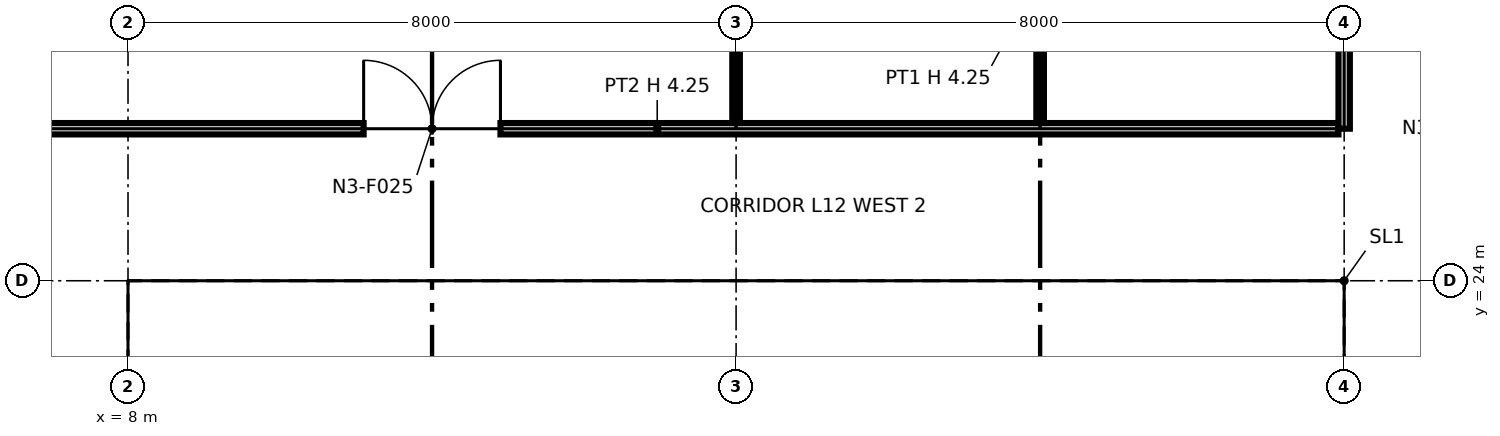
"""IFC4 building model, lengths in metres.
Left out: names, types, materials, properties, quantities, classifications, styles, units other than length and angle.
Written with IfcOpenShell. Run it as: python <this file> out.ifc"""

import sys

from ifc_helpers import new_model, si_unit, direction, frame, frame_2d, origin, origin_2d, place, context, subcontext, project, spatial, polyline, rectangle, i_section, outline, extrude, element, fill, save


model = new_model("IFC4")
c1 = context("Model", 3, precision=1e-05, world=origin(), true_north=direction((0.0, 1.0)))
c2 = subcontext(c1, "Body", "Model", "MODEL_VIEW")
j1 = project(units=[si_unit("LENGTHUNIT", "METRE"), si_unit("PLANEANGLEUNIT", "RADIAN")], contexts=[c1])
p1 = place(None, origin())
s1 = spatial("IfcSite", under=j1, at=p1, CompositionType="ELEMENT")
p2 = place(p1, origin())
s2 = spatial("IfcBuilding", under=s1, at=p2, CompositionType="ELEMENT")
p3 = place(p2, frame((0.0, 0.0, 70.0)))
s3 = spatial("IfcBuildingStorey", under=s2, at=p3, CompositionType="ELEMENT", Elevation=70.0)
for number, where, z_axis, x_axis in (
    (1, (8.0, 24.0, 0.0), (0.0, 0.0, 1.0), (1.0, 0.0, 0.0)),
    (2, (16.0, 24.0, 0.0), (0.0, 0.0, 1.0), (1.0, 0.0, 0.0)),
    (3, (24.0, 24.0, 0.0), (0.0, 0.0, 1.0), (1.0, 0.0, 0.0)),
):
    element("IfcColumn", number, at=place(p3, frame(where, z_axis=z_axis, x_axis=x_axis)), inside=s3, PredefinedType="COLUMN", context=c2, shape_type="SweptSolid", body=[
        extrude(i_section(OverallWidth=0.411, OverallDepth=0.434, WebThickness=0.036, FlangeThickness=0.057, at=origin_2d()), origin(), (0.0, 0.0, 1.0), 4.25),
    ])
p4 = place(p3, frame((8.75, 8.85, 0.0), z_axis=(0.0, 0.0, 1.0), x_axis=(0.0, 1.0, 0.0)))
e4 = element("IfcWall", 4, at=p4, inside=s3, PredefinedType="PARTITIONING", context=c2, shape_type="SweptSolid", body=[
    extrude(outline(polyline([(0.0, 0.0), (14.3, 0.0), (14.3, 4.25), (10.231, 4.25), (10.23, 3.789), (10.07, 3.789), (10.069, 4.25), (7.27, 4.25), (7.269, 3.632), (7.031, 3.632), (7.031, 4.25), (0.0, 4.25), (0.0, 0.0)])), frame((0.0, 0.1, 0.0), z_axis=(0.0, -1.0, 0.0), x_axis=(1.0, 0.0, 0.0)), (0.0, 0.0, 1.0), 0.2),
])
p5 = place(p4, frame((8.3, 0.0, 0.0)))
e5 = element("IfcOpeningElement", 5, at=p5, cuts=e4, PredefinedType="OPENING", context=c2, shape_type="SweptSolid", body=[
    extrude(rectangle(XDim=1.8, YDim=2.1, at=frame_2d((0.9, 1.05))), frame((0.0, 0.11, 0.0), z_axis=(0.0, -1.0, 0.0), x_axis=(1.0, 0.0, 0.0)), (0.0, 0.0, 1.0), 0.22),
])
p6 = place(p3, frame((8.65, 23.25, 0.0), z_axis=(0.0, 0.0, 1.0), x_axis=(1.0, 0.0, 0.0)))
e6 = element("IfcWall", 6, at=p6, inside=s3, PredefinedType="PARTITIONING", context=c2, shape_type="SweptSolid", body=[
    extrude(outline(polyline([(0.0, 0.0), (14.7, 0.0), (14.7, 4.25), (7.469, 4.25), (7.469, 3.632), (7.231, 3.632), (7.23, 4.25), (0.0, 4.25), (0.0, 0.0)])), frame((0.0, 0.1, 0.0), z_axis=(0.0, -1.0, 0.0), x_axis=(1.0, 0.0, 0.0)), (0.0, 0.0, 1.0), 0.2),
])
for number, where, z_axis, x_axis in (
    (7, (11.6, 20.0, 0.0), (0.0, 0.0, 1.0), (0.0, 1.0, 0.0)),
    (8, (14.3, 20.0, 0.0), (0.0, 0.0, 1.0), (0.0, 1.0, 0.0)),
):
    element("IfcWall", number, at=place(p3, frame(where, z_axis=z_axis, x_axis=x_axis)), inside=s3, PredefinedType="PARTITIONING", context=c2, shape_type="SweptSolid", body=[
        extrude(rectangle(XDim=3.15, YDim=0.2, at=frame_2d((1.575, 0.0))), origin(), (0.0, 0.0, 1.0), 4.25),
    ])
for number, where, z_axis, x_axis in (
    (9, (18.075, 20.0, 0.0), (0.0, 0.0, 1.0), (0.0, 1.0, 0.0)),
    (10, (20.425, 20.0, 0.0), (0.0, 0.0, 1.0), (0.0, 1.0, 0.0)),
):
    element("IfcWall", number, at=place(p3, frame(where, z_axis=z_axis, x_axis=x_axis)), inside=s3, PredefinedType="PARTITIONING", context=c2, shape_type="SweptSolid", body=[
        extrude(outline(polyline([(0.0, 0.0), (3.15, 0.0), (3.15, 4.25), (0.082, 4.25), (0.081, 3.789), (0.0, 3.789), (0.0, 0.0)])), frame((0.0, 0.075, 0.0), z_axis=(0.0, -1.0, 0.0), x_axis=(1.0, 0.0, 0.0)), (0.0, 0.0, 1.0), 0.15),
    ])
p7 = place(p3, frame((23.25, 8.85, 0.0), z_axis=(0.0, 0.0, 1.0), x_axis=(0.0, 1.0, 0.0)))
e11 = element("IfcWall", 11, at=p7, inside=s3, PredefinedType="PARTITIONING", context=c2, shape_type="SweptSolid", body=[
    extrude(outline(polyline([(0.0, 0.0), (14.3, 0.0), (14.3, 4.25), (11.231, 4.25), (11.23, 3.789), (11.07, 3.789), (11.069, 4.25), (7.27, 4.25), (7.269, 3.632), (7.031, 3.632), (7.031, 4.25), (1.231, 4.25), (1.23, 3.789), (1.07, 3.789), (1.069, 4.25), (0.0, 4.25), (0.0, 0.0)])), frame((0.0, 0.1, 0.0), z_axis=(0.0, -1.0, 0.0), x_axis=(1.0, 0.0, 0.0)), (0.0, 0.0, 1.0), 0.2),
])
p8 = place(p7, frame((8.3, 0.0, 0.0)))
e12 = element("IfcOpeningElement", 12, at=p8, cuts=e11, PredefinedType="OPENING", context=c2, shape_type="SweptSolid", body=[
    extrude(rectangle(XDim=1.8, YDim=2.1, at=frame_2d((0.9, 1.05))), frame((0.0, 0.11, 0.0), z_axis=(0.0, -1.0, 0.0), x_axis=(1.0, 0.0, 0.0)), (0.0, 0.0, 1.0), 0.22),
])
p9 = place(p3, frame((6.0, 26.0, 0.0), z_axis=(0.0, 0.0, 1.0), x_axis=(1.0, 0.0, 0.0)))
e13 = element("IfcWall", 13, at=p9, inside=s3, PredefinedType="PARTITIONING", context=c2, shape_type="SweptSolid", body=[
    extrude(rectangle(XDim=17.925, YDim=0.15, at=frame_2d((8.962, 0.0))), origin(), (0.0, 0.0, 1.0), 4.25),
])
p10 = place(p9, frame((5.1, 0.0, 0.0)))
e14 = element("IfcOpeningElement", 14, at=p10, cuts=e13, PredefinedType="OPENING", context=c2, shape_type="SweptSolid", body=[
    extrude(rectangle(XDim=1.8, YDim=2.1, at=frame_2d((0.9, 1.05))), frame((0.0, 0.085, 0.0), z_axis=(0.0, -1.0, 0.0), x_axis=(1.0, 0.0, 0.0)), (0.0, 0.0, 1.0), 0.17),
])
p11 = place(p3, frame((16.0, 26.075, 0.0), z_axis=(0.0, 0.0, 1.0), x_axis=(0.0, 1.0, 0.0)))
e15 = element("IfcWall", 15, at=p11, inside=s3, PredefinedType="PARTITIONING", context=c2, shape_type="SweptSolid", body=[
    extrude(rectangle(XDim=3.85, YDim=0.1, at=frame_2d((1.925, 0.0))), origin(), (0.0, 0.0, 1.0), 3.47),
])
p12 = place(p3, frame((20.0, 26.075, 0.0), z_axis=(0.0, 0.0, 1.0), x_axis=(0.0, 1.0, 0.0)))
e16 = element("IfcWall", 16, at=p12, inside=s3, PredefinedType="PARTITIONING", context=c2, shape_type="SweptSolid", body=[
    extrude(outline(polyline([(0.0, 0.0), (3.85, 0.0), (3.85, 4.25), (2.225, 4.25), (2.223, 3.47), (1.627, 3.47), (1.625, 4.25), (0.0, 4.25), (0.0, 0.0)])), frame((0.0, 0.05, 0.0), z_axis=(0.0, -1.0, 0.0), x_axis=(1.0, 0.0, 0.0)), (0.0, 0.0, 1.0), 0.1),
])
p13 = place(p3, frame((24.0, 26.0, 0.0), z_axis=(0.0, 0.0, 1.0), x_axis=(0.0, 1.0, 0.0)))
e17 = element("IfcWall", 17, at=p13, inside=s3, PredefinedType="PARTITIONING", context=c2, shape_type="SweptSolid", body=[
    extrude(rectangle(XDim=5.97, YDim=0.15, at=frame_2d((2.985, 0.0))), origin(), (0.0, 0.0, 1.0), 3.47),
])
p14 = place(p13, frame((2.5, 0.0, 0.0)))
e18 = element("IfcOpeningElement", 18, at=p14, cuts=e17, PredefinedType="OPENING", context=c2, shape_type="SweptSolid", body=[
    extrude(rectangle(XDim=1.0, YDim=2.1, at=frame_2d((0.5, 1.05))), frame((0.0, 0.085, 0.0), z_axis=(0.0, -1.0, 0.0), x_axis=(1.0, 0.0, 0.0)), (0.0, 0.0, 1.0), 0.17),
])
p15 = place(p10, origin())
e19 = element("IfcDoor", 19, at=p15, inside=s3, OperationType="DOUBLE_DOOR_SINGLE_SWING", PredefinedType="DOOR", context=c2, shape_type="SweptSolid", body=[
    extrude(rectangle(XDim=1.8, YDim=2.1, at=frame_2d((0.9, 1.05))), frame((0.0, 0.025, 0.0), z_axis=(0.0, -1.0, 0.0), x_axis=(1.0, 0.0, 0.0)), (0.0, 0.0, 1.0), 0.05),
])
fill(e14, e19)
save(model, sys.argv[1])
